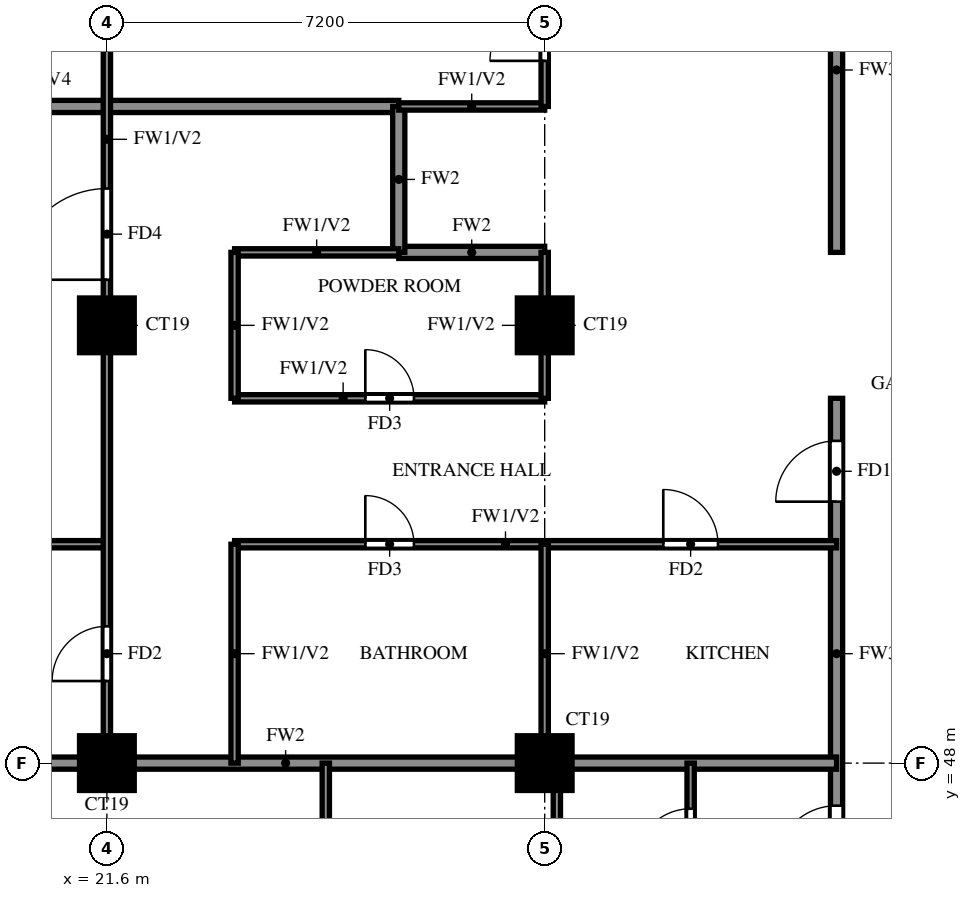
"""IFC4 building model, lengths in metres.
Left out: names, types, materials, properties, quantities, classifications, styles, units other than length and angle.
Written with IfcOpenShell. Run it as: python <this file> out.ifc"""

import sys

from ifc_helpers import new_model, si_unit, direction, frame, frame_2d, origin, origin_2d, place, context, subcontext, project, spatial, rectangle, extrude, source, transform, mapped, element, fill, save


model = new_model("IFC4")
c1 = context("Model", 3, precision=1e-05, world=origin(), true_north=direction((0.0, 1.0)))
c2 = subcontext(c1, "Body", "Model", "MODEL_VIEW")
j1 = project(units=[si_unit("LENGTHUNIT", "METRE"), si_unit("PLANEANGLEUNIT", "RADIAN")], contexts=[c1])
p1 = place(None, origin())
s1 = spatial("IfcSite", under=j1, at=p1, CompositionType="ELEMENT")
p2 = place(p1, origin())
s2 = spatial("IfcBuilding", under=s1, at=p2, CompositionType="ELEMENT")
p3 = place(p2, frame((0.0, 0.0, 174.5)))
s3 = spatial("IfcBuildingStorey", under=s2, at=p3, CompositionType="ELEMENT", Elevation=174.5)
m1 = source(origin(), c2, "Body", "SweptSolid", [
    extrude(rectangle(XDim=0.9, YDim=0.9, at=origin_2d()), origin(), (0.0, 0.0, 1.0), 3.2),
])
for number, where, z_axis, x_axis in (
    (1, (21.6, 48.0, 0.0), (0.0, 0.0, 1.0), (1.0, 0.0, 0.0)),
    (2, (28.8, 48.0, 0.0), (0.0, 0.0, 1.0), (1.0, 0.0, 0.0)),
    (3, (21.6, 55.2, 0.0), (0.0, 0.0, 1.0), (1.0, 0.0, 0.0)),
    (4, (28.8, 55.2, 0.0), (0.0, 0.0, 1.0), (1.0, 0.0, 0.0)),
):
    element("IfcColumn", number, at=place(p3, frame(where, z_axis=z_axis, x_axis=x_axis)), inside=s3, PredefinedType="COLUMN", context=c2, shape_type="MappedRepresentation", body=[
        mapped(m1, transform((0.0, 0.0, 0.0))),
    ])
p4 = place(p3, frame((33.6, 45.6, 0.0), z_axis=(0.0, 0.0, 1.0), x_axis=(0.0, 1.0, 0.0)))
e5 = element("IfcWall", 5, at=p4, inside=s3, PredefinedType="SOLIDWALL", context=c2, shape_type="SweptSolid", body=[
    extrude(rectangle(XDim=8.4, YDim=0.2, at=frame_2d((4.2, 0.0))), origin(), (0.0, 0.0, 1.0), 3.2),
])
p5 = place(p4, frame((0.7, 0.0, 0.0)))
e6 = element("IfcOpeningElement", 6, at=p5, cuts=e5, PredefinedType="OPENING", context=c2, shape_type="SweptSolid", body=[
    extrude(rectangle(XDim=1.0, YDim=2.1, at=frame_2d((0.5, 1.05))), frame((0.0, 0.11, 0.0), z_axis=(0.0, -1.0, 0.0), x_axis=(1.0, 0.0, 0.0)), (0.0, 0.0, 1.0), 0.22),
])
p6 = place(p4, frame((6.7, 0.0, 0.0)))
e7 = element("IfcOpeningElement", 7, at=p6, cuts=e5, PredefinedType="OPENING", context=c2, shape_type="SweptSolid", body=[
    extrude(rectangle(XDim=1.0, YDim=2.1, at=frame_2d((0.5, 1.05))), frame((0.0, 0.11, 0.0), z_axis=(0.0, -1.0, 0.0), x_axis=(1.0, 0.0, 0.0)), (0.0, 0.0, 1.0), 0.22),
])
p7 = place(p3, frame((33.6, 56.4, 0.0), z_axis=(0.0, 0.0, 1.0), x_axis=(0.0, 1.0, 0.0)))
e8 = element("IfcWall", 8, at=p7, inside=s3, PredefinedType="SOLIDWALL", context=c2, shape_type="SweptSolid", body=[
    extrude(rectangle(XDim=6.0, YDim=0.2, at=frame_2d((3.0, 0.0))), origin(), (0.0, 0.0, 1.0), 3.2),
])
p8 = place(p7, frame((3.7, 0.0, 0.0)))
e9 = element("IfcOpeningElement", 9, at=p8, cuts=e8, PredefinedType="OPENING", context=c2, shape_type="SweptSolid", body=[
    extrude(rectangle(XDim=1.0, YDim=2.1, at=frame_2d((0.5, 1.05))), frame((0.0, 0.11, 0.0), z_axis=(0.0, -1.0, 0.0), x_axis=(1.0, 0.0, 0.0)), (0.0, 0.0, 1.0), 0.22),
])
p9 = place(p3, frame((14.525, 48.0, 0.0), z_axis=(0.0, 0.0, 1.0), x_axis=(1.0, 0.0, 0.0)))
e10 = element("IfcWall", 10, at=p9, inside=s3, PredefinedType="SOLIDWALL", context=c2, shape_type="SweptSolid", body=[
    extrude(rectangle(XDim=19.075, YDim=0.2, at=frame_2d((9.538, 0.0))), origin(), (0.0, 0.0, 1.0), 3.2),
])
p10 = place(p3, frame((26.4, 56.4, 0.0), z_axis=(0.0, 0.0, 1.0), x_axis=(1.0, 0.0, 0.0)))
e11 = element("IfcWall", 11, at=p10, inside=s3, PredefinedType="SOLIDWALL", context=c2, shape_type="SweptSolid", body=[
    extrude(rectangle(XDim=2.4, YDim=0.2, at=frame_2d((1.2, 0.0))), origin(), (0.0, 0.0, 1.0), 3.2),
])
p11 = place(p3, frame((14.525, 58.8, 0.0), z_axis=(0.0, 0.0, 1.0), x_axis=(1.0, 0.0, 0.0)))
e12 = element("IfcWall", 12, at=p11, inside=s3, PredefinedType="SOLIDWALL", context=c2, shape_type="SweptSolid", body=[
    extrude(rectangle(XDim=11.875, YDim=0.2, at=frame_2d((5.938, 0.0))), origin(), (0.0, 0.0, 1.0), 2.3),
])
p12 = place(p3, frame((26.4, 56.4, 0.0), z_axis=(0.0, 0.0, 1.0), x_axis=(0.0, 1.0, 0.0)))
e13 = element("IfcWall", 13, at=p12, inside=s3, PredefinedType="SOLIDWALL", context=c2, shape_type="SweptSolid", body=[
    extrude(rectangle(XDim=2.4, YDim=0.2, at=frame_2d((1.2, 0.0))), origin(), (0.0, 0.0, 1.0), 3.2),
])
p13 = place(p3, frame((14.525, 51.6, 0.0), z_axis=(0.0, 0.0, 1.0), x_axis=(1.0, 0.0, 0.0)))
e14 = element("IfcWall", 14, at=p13, inside=s3, PredefinedType="PARTITIONING", context=c2, shape_type="SweptSolid", body=[
    extrude(rectangle(XDim=7.075, YDim=0.12, at=frame_2d((3.538, 0.0))), origin(), (0.0, 0.0, 1.0), 2.3),
])
p14 = place(p3, frame((23.7, 51.6, 0.0), z_axis=(0.0, 0.0, 1.0), x_axis=(1.0, 0.0, 0.0)))
e15 = element("IfcWall", 15, at=p14, inside=s3, PredefinedType="PARTITIONING", context=c2, shape_type="SweptSolid", body=[
    extrude(rectangle(XDim=9.9, YDim=0.12, at=frame_2d((4.95, 0.0))), origin(), (0.0, 0.0, 1.0), 3.2),
])
p15 = place(p14, frame((2.15, 0.0, 0.0)))
e16 = element("IfcOpeningElement", 16, at=p15, cuts=e15, PredefinedType="OPENING", context=c2, shape_type="SweptSolid", body=[
    extrude(rectangle(XDim=0.8, YDim=2.1, at=frame_2d((0.4, 1.05))), frame((0.0, 0.07, 0.0), z_axis=(0.0, -1.0, 0.0), x_axis=(1.0, 0.0, 0.0)), (0.0, 0.0, 1.0), 0.14),
])
p16 = place(p14, frame((7.05, 0.0, 0.0)))
e17 = element("IfcOpeningElement", 17, at=p16, cuts=e15, PredefinedType="OPENING", context=c2, shape_type="SweptSolid", body=[
    extrude(rectangle(XDim=0.9, YDim=2.1, at=frame_2d((0.45, 1.05))), frame((0.0, 0.07, 0.0), z_axis=(0.0, -1.0, 0.0), x_axis=(1.0, 0.0, 0.0)), (0.0, 0.0, 1.0), 0.14),
])
p17 = place(p3, frame((23.7, 54.0, 0.0), z_axis=(0.0, 0.0, 1.0), x_axis=(1.0, 0.0, 0.0)))
e18 = element("IfcWall", 18, at=p17, inside=s3, PredefinedType="PARTITIONING", context=c2, shape_type="SweptSolid", body=[
    extrude(rectangle(XDim=5.1, YDim=0.12, at=frame_2d((2.55, 0.0))), origin(), (0.0, 0.0, 1.0), 3.2),
])
p18 = place(p17, frame((2.15, 0.0, 0.0)))
e19 = element("IfcOpeningElement", 19, at=p18, cuts=e18, PredefinedType="OPENING", context=c2, shape_type="SweptSolid", body=[
    extrude(rectangle(XDim=0.8, YDim=2.1, at=frame_2d((0.4, 1.05))), frame((0.0, 0.07, 0.0), z_axis=(0.0, -1.0, 0.0), x_axis=(1.0, 0.0, 0.0)), (0.0, 0.0, 1.0), 0.14),
])
p19 = place(p3, frame((23.7, 56.4, 0.0), z_axis=(0.0, 0.0, 1.0), x_axis=(1.0, 0.0, 0.0)))
e20 = element("IfcWall", 20, at=p19, inside=s3, PredefinedType="PARTITIONING", context=c2, shape_type="SweptSolid", body=[
    extrude(rectangle(XDim=2.7, YDim=0.12, at=frame_2d((1.35, 0.0))), origin(), (0.0, 0.0, 1.0), 3.2),
])
p20 = place(p3, frame((26.4, 58.8, 0.0), z_axis=(0.0, 0.0, 1.0), x_axis=(1.0, 0.0, 0.0)))
e21 = element("IfcWall", 21, at=p20, inside=s3, PredefinedType="PARTITIONING", context=c2, shape_type="SweptSolid", body=[
    extrude(rectangle(XDim=2.4, YDim=0.12, at=frame_2d((1.2, 0.0))), origin(), (0.0, 0.0, 1.0), 3.2),
])
p21 = place(p3, frame((21.6, 48.0, 0.0), z_axis=(0.0, 0.0, 1.0), x_axis=(0.0, 1.0, 0.0)))
e22 = element("IfcWall", 22, at=p21, inside=s3, PredefinedType="PARTITIONING", context=c2, shape_type="SweptSolid", body=[
    extrude(rectangle(XDim=21.6, YDim=0.12, at=frame_2d((10.8, 0.0))), origin(), (0.0, 0.0, 1.0), 3.2),
])
p22 = place(p21, frame((1.35, 0.0, 0.0)))
e23 = element("IfcOpeningElement", 23, at=p22, cuts=e22, PredefinedType="OPENING", context=c2, shape_type="SweptSolid", body=[
    extrude(rectangle(XDim=0.9, YDim=2.1, at=frame_2d((0.45, 1.05))), frame((0.0, 0.07, 0.0), z_axis=(0.0, -1.0, 0.0), x_axis=(1.0, 0.0, 0.0)), (0.0, 0.0, 1.0), 0.14),
])
p23 = place(p21, frame((7.95, 0.0, 0.0)))
e24 = element("IfcOpeningElement", 24, at=p23, cuts=e22, PredefinedType="OPENING", context=c2, shape_type="SweptSolid", body=[
    extrude(rectangle(XDim=1.5, YDim=2.1, at=frame_2d((0.75, 1.05))), frame((0.0, 0.07, 0.0), z_axis=(0.0, -1.0, 0.0), x_axis=(1.0, 0.0, 0.0)), (0.0, 0.0, 1.0), 0.14),
])
p24 = place(p21, frame((12.15, 0.0, 0.0)))
e25 = element("IfcOpeningElement", 25, at=p24, cuts=e22, PredefinedType="OPENING", context=c2, shape_type="SweptSolid", body=[
    extrude(rectangle(XDim=0.9, YDim=2.1, at=frame_2d((0.45, 1.05))), frame((0.0, 0.07, 0.0), z_axis=(0.0, -1.0, 0.0), x_axis=(1.0, 0.0, 0.0)), (0.0, 0.0, 1.0), 0.14),
])
p25 = place(p21, frame((17.55, 0.0, 0.0)))
e26 = element("IfcOpeningElement", 26, at=p25, cuts=e22, PredefinedType="OPENING", context=c2, shape_type="SweptSolid", body=[
    extrude(rectangle(XDim=0.9, YDim=2.1, at=frame_2d((0.45, 1.05))), frame((0.0, 0.07, 0.0), z_axis=(0.0, -1.0, 0.0), x_axis=(1.0, 0.0, 0.0)), (0.0, 0.0, 1.0), 0.14),
])
p26 = place(p3, frame((23.7, 48.0, 0.0), z_axis=(0.0, 0.0, 1.0), x_axis=(0.0, 1.0, 0.0)))
e27 = element("IfcWall", 27, at=p26, inside=s3, PredefinedType="PARTITIONING", context=c2, shape_type="SweptSolid", body=[
    extrude(rectangle(XDim=3.6, YDim=0.12, at=frame_2d((1.8, 0.0))), origin(), (0.0, 0.0, 1.0), 3.2),
])
p27 = place(p3, frame((23.7, 54.0, 0.0), z_axis=(0.0, 0.0, 1.0), x_axis=(0.0, 1.0, 0.0)))
e28 = element("IfcWall", 28, at=p27, inside=s3, PredefinedType="PARTITIONING", context=c2, shape_type="SweptSolid", body=[
    extrude(rectangle(XDim=2.4, YDim=0.12, at=frame_2d((1.2, 0.0))), origin(), (0.0, 0.0, 1.0), 3.2),
])
p28 = place(p3, frame((25.2, 39.725, 0.0), z_axis=(0.0, 0.0, 1.0), x_axis=(0.0, 1.0, 0.0)))
e29 = element("IfcWall", 29, at=p28, inside=s3, PredefinedType="PARTITIONING", context=c2, shape_type="SweptSolid", body=[
    extrude(rectangle(XDim=8.275, YDim=0.12, at=frame_2d((4.137, 0.0))), origin(), (0.0, 0.0, 1.0), 3.2),
])
p29 = place(p28, frame((4.525, 0.0, 0.0)))
e30 = element("IfcOpeningElement", 30, at=p29, cuts=e29, PredefinedType="OPENING", context=c2, shape_type="SweptSolid", body=[
    extrude(rectangle(XDim=0.9, YDim=2.1, at=frame_2d((0.45, 1.05))), frame((0.0, 0.07, 0.0), z_axis=(0.0, -1.0, 0.0), x_axis=(1.0, 0.0, 0.0)), (0.0, 0.0, 1.0), 0.14),
])
p30 = place(p3, frame((28.8, 48.0, 0.0), z_axis=(0.0, 0.0, 1.0), x_axis=(0.0, 1.0, 0.0)))
e31 = element("IfcWall", 31, at=p30, inside=s3, PredefinedType="PARTITIONING", context=c2, shape_type="SweptSolid", body=[
    extrude(rectangle(XDim=3.6, YDim=0.12, at=frame_2d((1.8, 0.0))), origin(), (0.0, 0.0, 1.0), 3.2),
])
p31 = place(p3, frame((28.8, 54.0, 0.0), z_axis=(0.0, 0.0, 1.0), x_axis=(0.0, 1.0, 0.0)))
e32 = element("IfcWall", 32, at=p31, inside=s3, PredefinedType="PARTITIONING", context=c2, shape_type="SweptSolid", body=[
    extrude(rectangle(XDim=2.4, YDim=0.12, at=frame_2d((1.2, 0.0))), origin(), (0.0, 0.0, 1.0), 3.2),
])
p32 = place(p3, frame((28.8, 58.8, 0.0), z_axis=(0.0, 0.0, 1.0), x_axis=(0.0, 1.0, 0.0)))
e33 = element("IfcWall", 33, at=p32, inside=s3, PredefinedType="PARTITIONING", context=c2, shape_type="SweptSolid", body=[
    extrude(rectangle(XDim=3.6, YDim=0.12, at=frame_2d((1.8, 0.0))), origin(), (0.0, 0.0, 1.0), 3.2),
])
p33 = place(p32, frame((0.75, 0.0, 0.0)))
e34 = element("IfcOpeningElement", 34, at=p33, cuts=e33, PredefinedType="OPENING", context=c2, shape_type="SweptSolid", body=[
    extrude(rectangle(XDim=0.9, YDim=2.1, at=frame_2d((0.45, 1.05))), frame((0.0, 0.07, 0.0), z_axis=(0.0, -1.0, 0.0), x_axis=(1.0, 0.0, 0.0)), (0.0, 0.0, 1.0), 0.14),
])
p34 = place(p3, frame((29.0, 45.6, 0.0), z_axis=(0.0, 0.0, 1.0), x_axis=(0.0, 1.0, 0.0)))
e35 = element("IfcWall", 35, at=p34, inside=s3, PredefinedType="PARTITIONING", context=c2, shape_type="SweptSolid", body=[
    extrude(rectangle(XDim=2.4, YDim=0.12, at=frame_2d((1.2, 0.0))), origin(), (0.0, 0.0, 1.0), 3.2),
])
p35 = place(p3, frame((31.2, 45.6, 0.0), z_axis=(0.0, 0.0, 1.0), x_axis=(0.0, 1.0, 0.0)))
e36 = element("IfcWall", 36, at=p35, inside=s3, PredefinedType="PARTITIONING", context=c2, shape_type="SweptSolid", body=[
    extrude(rectangle(XDim=2.4, YDim=0.12, at=frame_2d((1.2, 0.0))), origin(), (0.0, 0.0, 1.0), 3.2),
])
p36 = place(p35, frame((0.75, 0.0, 0.0)))
e37 = element("IfcOpeningElement", 37, at=p36, cuts=e36, PredefinedType="OPENING", context=c2, shape_type="SweptSolid", body=[
    extrude(rectangle(XDim=0.9, YDim=2.1, at=frame_2d((0.45, 1.05))), frame((0.0, 0.07, 0.0), z_axis=(0.0, -1.0, 0.0), x_axis=(1.0, 0.0, 0.0)), (0.0, 0.0, 1.0), 0.14),
])
p37 = place(p5, origin())
e38 = element("IfcDoor", 38, at=p37, inside=s3, OperationType="SINGLE_SWING_LEFT", PredefinedType="DOOR", context=c2, shape_type="SweptSolid", body=[
    extrude(rectangle(XDim=1.0, YDim=2.1, at=frame_2d((0.5, 1.05))), frame((0.0, 0.025, 0.0), z_axis=(0.0, -1.0, 0.0), x_axis=(1.0, 0.0, 0.0)), (0.0, 0.0, 1.0), 0.05),
])
fill(e6, e38)
p38 = place(p36, origin())
e39 = element("IfcDoor", 39, at=p38, inside=s3, OperationType="SINGLE_SWING_RIGHT", PredefinedType="DOOR", context=c2, shape_type="SweptSolid", body=[
    extrude(rectangle(XDim=0.9, YDim=2.1, at=frame_2d((0.45, 1.05))), frame((0.0, 0.025, 0.0), z_axis=(0.0, -1.0, 0.0), x_axis=(1.0, 0.0, 0.0)), (0.0, 0.0, 1.0), 0.05),
])
fill(e37, e39)
p39 = place(p6, origin())
e40 = element("IfcDoor", 40, at=p39, inside=s3, OperationType="SINGLE_SWING_LEFT", PredefinedType="DOOR", context=c2, shape_type="SweptSolid", body=[
    extrude(rectangle(XDim=1.0, YDim=2.1, at=frame_2d((0.5, 1.05))), frame((0.0, 0.025, 0.0), z_axis=(0.0, -1.0, 0.0), x_axis=(1.0, 0.0, 0.0)), (0.0, 0.0, 1.0), 0.05),
])
fill(e7, e40)
p40 = place(p22, origin())
e41 = element("IfcDoor", 41, at=p40, inside=s3, OperationType="SINGLE_SWING_RIGHT", PredefinedType="DOOR", context=c2, shape_type="SweptSolid", body=[
    extrude(rectangle(XDim=0.9, YDim=2.1, at=frame_2d((0.45, 1.05))), frame((0.0, 0.025, 0.0), z_axis=(0.0, -1.0, 0.0), x_axis=(1.0, 0.0, 0.0)), (0.0, 0.0, 1.0), 0.05),
])
fill(e23, e41)
p41 = place(p23, origin())
e42 = element("IfcDoor", 42, at=p41, inside=s3, OperationType="SINGLE_SWING_RIGHT", PredefinedType="DOOR", context=c2, shape_type="SweptSolid", body=[
    extrude(rectangle(XDim=1.5, YDim=2.1, at=frame_2d((0.75, 1.05))), frame((0.0, 0.025, 0.0), z_axis=(0.0, -1.0, 0.0), x_axis=(1.0, 0.0, 0.0)), (0.0, 0.0, 1.0), 0.05),
])
fill(e24, e42)
p42 = place(p15, origin())
e43 = element("IfcDoor", 43, at=p42, inside=s3, OperationType="SINGLE_SWING_LEFT", PredefinedType="DOOR", context=c2, shape_type="SweptSolid", body=[
    extrude(rectangle(XDim=0.8, YDim=2.1, at=frame_2d((0.4, 1.05))), frame((0.0, 0.025, 0.0), z_axis=(0.0, -1.0, 0.0), x_axis=(1.0, 0.0, 0.0)), (0.0, 0.0, 1.0), 0.05),
])
fill(e16, e43)
p43 = place(p18, origin())
e44 = element("IfcDoor", 44, at=p43, inside=s3, OperationType="SINGLE_SWING_RIGHT", PredefinedType="DOOR", context=c2, shape_type="SweptSolid", body=[
    extrude(rectangle(XDim=0.8, YDim=2.1, at=frame_2d((0.4, 1.05))), frame((0.0, 0.025, 0.0), z_axis=(0.0, -1.0, 0.0), x_axis=(1.0, 0.0, 0.0)), (0.0, 0.0, 1.0), 0.05),
])
fill(e19, e44)
p44 = place(p16, origin())
e45 = element("IfcDoor", 45, at=p44, inside=s3, OperationType="SINGLE_SWING_LEFT", PredefinedType="DOOR", context=c2, shape_type="SweptSolid", body=[
    extrude(rectangle(XDim=0.9, YDim=2.1, at=frame_2d((0.45, 1.05))), frame((0.0, 0.025, 0.0), z_axis=(0.0, -1.0, 0.0), x_axis=(1.0, 0.0, 0.0)), (0.0, 0.0, 1.0), 0.05),
])
fill(e17, e45)
p45 = place(p33, origin())
e46 = element("IfcDoor", 46, at=p45, inside=s3, OperationType="SINGLE_SWING_LEFT", PredefinedType="DOOR", context=c2, shape_type="SweptSolid", body=[
    extrude(rectangle(XDim=0.9, YDim=2.1, at=frame_2d((0.45, 1.05))), frame((0.0, 0.025, 0.0), z_axis=(0.0, -1.0, 0.0), x_axis=(1.0, 0.0, 0.0)), (0.0, 0.0, 1.0), 0.05),
])
fill(e34, e46)
save(model, sys.argv[1])
